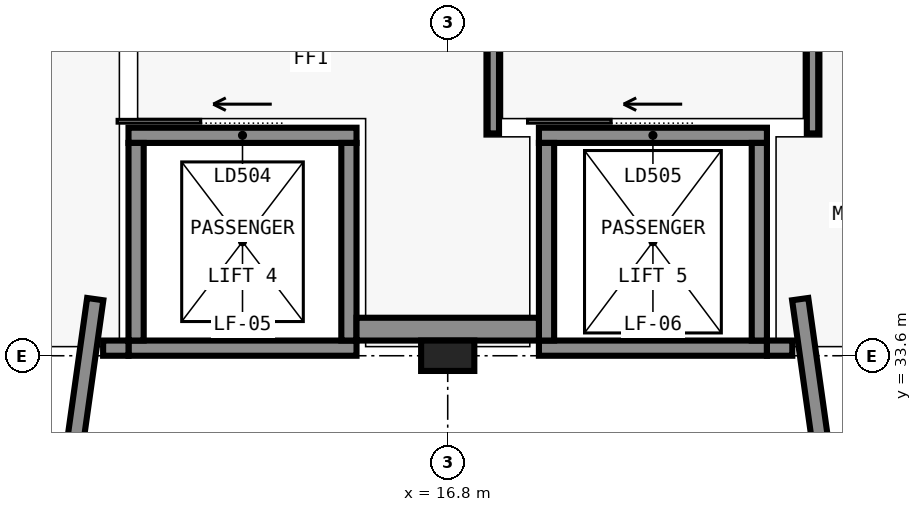
"""IFC4 building model, lengths in metres.
Left out: names, types, materials, properties, quantities, classifications, styles, units other than length and angle.
Written with IfcOpenShell. Run it as: python <this file> out.ifc"""

import sys

from ifc_helpers import new_model, si_unit, direction, frame, frame_2d, origin, origin_2d, place, context, subcontext, project, spatial, rectangle, extrude, element, fill, save


model = new_model("IFC4")
c1 = context("Model", 3, precision=1e-05, world=origin(), true_north=direction((0.0, 1.0)))
c2 = subcontext(c1, "Body", "Model", "MODEL_VIEW")
j1 = project(units=[si_unit("LENGTHUNIT", "METRE"), si_unit("PLANEANGLEUNIT", "RADIAN")], contexts=[c1])
p1 = place(None, origin())
s1 = spatial("IfcSite", under=j1, at=p1, CompositionType="ELEMENT")
p2 = place(p1, origin())
s2 = spatial("IfcBuilding", under=s1, at=p2, CompositionType="ELEMENT")
p3 = place(p2, frame((0.0, 0.0, 24.6)))
s3 = spatial("IfcBuildingStorey", under=s2, at=p3, CompositionType="ELEMENT", Elevation=24.6)
p4 = place(p3, frame((15.6, 33.7, 0.0), z_axis=(0.0, 0.0, 1.0), x_axis=(-1.0, 0.0, 0.0)))
e1 = element("IfcWall", 1, at=p4, inside=s3, PredefinedType="SHEAR", context=c2, shape_type="SweptSolid", body=[
    extrude(rectangle(XDim=3.0, YDim=0.2, at=frame_2d((1.5, 0.0))), origin(), (0.0, 0.0, 1.0), 4.112),
])
p5 = place(p3, frame((12.6, 36.5, 0.0), z_axis=(0.0, 0.0, 1.0), x_axis=(1.0, 0.0, 0.0)))
e2 = element("IfcWall", 2, at=p5, inside=s3, PredefinedType="SHEAR", context=c2, shape_type="SweptSolid", body=[
    extrude(rectangle(XDim=3.0, YDim=0.2, at=frame_2d((1.5, 0.0))), origin(), (0.0, 0.0, 1.0), 4.5),
])
p6 = place(p5, frame((0.95, 0.0, 0.0)))
e3 = element("IfcOpeningElement", 3, at=p6, cuts=e2, PredefinedType="OPENING", context=c2, shape_type="SweptSolid", body=[
    extrude(rectangle(XDim=1.1, YDim=2.1, at=frame_2d((0.55, 1.05))), frame((0.0, 0.11, 0.0), z_axis=(0.0, -1.0, 0.0), x_axis=(1.0, 0.0, 0.0)), (0.0, 0.0, 1.0), 0.22),
])
for number, where, z_axis, x_axis in (
    (4, (12.7, 33.8, 0.0), (0.0, 0.0, 1.0), (0.0, 1.0, 0.0)),
    (5, (15.5, 36.4, 0.0), (0.0, 0.0, 1.0), (0.0, -1.0, 0.0)),
):
    element("IfcWall", number, at=place(p3, frame(where, z_axis=z_axis, x_axis=x_axis)), inside=s3, PredefinedType="SHEAR", context=c2, shape_type="SweptSolid", body=[
        extrude(rectangle(XDim=2.6, YDim=0.2, at=frame_2d((1.3, 0.0))), origin(), (0.0, 0.0, 1.0), 4.5),
    ])
p7 = place(p3, frame((21.0, 33.7, 0.0), z_axis=(0.0, 0.0, 1.0), x_axis=(-1.0, 0.0, 0.0)))
e6 = element("IfcWall", 6, at=p7, inside=s3, PredefinedType="SHEAR", context=c2, shape_type="SweptSolid", body=[
    extrude(rectangle(XDim=3.0, YDim=0.2, at=frame_2d((1.5, 0.0))), origin(), (0.0, 0.0, 1.0), 4.112),
])
p8 = place(p3, frame((18.0, 36.5, 0.0), z_axis=(0.0, 0.0, 1.0), x_axis=(1.0, 0.0, 0.0)))
e7 = element("IfcWall", 7, at=p8, inside=s3, PredefinedType="SHEAR", context=c2, shape_type="SweptSolid", body=[
    extrude(rectangle(XDim=3.0, YDim=0.2, at=frame_2d((1.5, 0.0))), origin(), (0.0, 0.0, 1.0), 4.5),
])
p9 = place(p8, frame((0.95, 0.0, 0.0)))
e8 = element("IfcOpeningElement", 8, at=p9, cuts=e7, PredefinedType="OPENING", context=c2, shape_type="SweptSolid", body=[
    extrude(rectangle(XDim=1.1, YDim=2.1, at=frame_2d((0.55, 1.05))), frame((0.0, 0.11, 0.0), z_axis=(0.0, -1.0, 0.0), x_axis=(1.0, 0.0, 0.0)), (0.0, 0.0, 1.0), 0.22),
])
for number, where, z_axis, x_axis in (
    (9, (18.1, 33.8, 0.0), (0.0, 0.0, 1.0), (0.0, 1.0, 0.0)),
    (10, (20.9, 36.4, 0.0), (0.0, 0.0, 1.0), (0.0, -1.0, 0.0)),
):
    element("IfcWall", number, at=place(p3, frame(where, z_axis=z_axis, x_axis=x_axis)), inside=s3, PredefinedType="SHEAR", context=c2, shape_type="SweptSolid", body=[
        extrude(rectangle(XDim=2.6, YDim=0.2, at=frame_2d((1.3, 0.0))), origin(), (0.0, 0.0, 1.0), 4.5),
    ])
p10 = place(p3, frame((12.6, 33.7, 0.0), z_axis=(0.0, 0.0, 1.0), x_axis=(-1.0, 0.0, 0.0)))
e11 = element("IfcWall", 11, at=p10, inside=s3, PredefinedType="SHEAR", context=c2, shape_type="SweptSolid", body=[
    extrude(rectangle(XDim=0.334, YDim=0.2, at=frame_2d((0.167, 0.0))), origin(), (0.0, 0.0, 1.0), 4.5),
])
p11 = place(p3, frame((21.334, 33.7, 0.0), z_axis=(0.0, 0.0, 1.0), x_axis=(-1.0, 0.0, 0.0)))
e12 = element("IfcWall", 12, at=p11, inside=s3, PredefinedType="SHEAR", context=c2, shape_type="SweptSolid", body=[
    extrude(rectangle(XDim=0.334, YDim=0.2, at=frame_2d((0.167, 0.0))), origin(), (0.0, 0.0, 1.0), 4.5),
])
p12 = place(p3, frame((16.8, 33.6, 0.0), z_axis=(0.0, 0.0, 1.0), x_axis=(1.0, 0.0, 0.0)))
e13 = element("IfcColumn", 13, at=p12, inside=s3, PredefinedType="COLUMN", context=c2, shape_type="SweptSolid", body=[
    extrude(rectangle(XDim=0.7, YDim=0.4, at=origin_2d()), origin(), (0.0, 0.0, 1.0), 4.5),
])
p13 = place(p3, frame((12.162, 34.345, 0.0), z_axis=(0.0, 0.0, 1.0), x_axis=(-0.139120311566, -0.990275486372, 0.0)))
e14 = element("IfcWall", 14, at=p13, inside=s3, PredefinedType="SOLIDWALL", context=c2, shape_type="SweptSolid", body=[
    extrude(rectangle(XDim=2.169, YDim=0.215, at=frame_2d((1.084, 0.0))), origin(), (0.0, 0.0, 1.0), 4.2),
])
p14 = place(p3, frame((21.438, 34.345, 0.0), z_axis=(0.0, 0.0, 1.0), x_axis=(0.139230687381, -0.99025997379, 0.0)))
e15 = element("IfcWall", 15, at=p14, inside=s3, PredefinedType="SOLIDWALL", context=c2, shape_type="SweptSolid", body=[
    extrude(rectangle(XDim=2.169, YDim=0.215, at=frame_2d((1.084, 0.0))), origin(), (0.0, 0.0, 1.0), 4.2),
])
p15 = place(p3, frame((18.0, 33.95, 0.0), z_axis=(0.0, 0.0, 1.0), x_axis=(-1.0, 0.0, 0.0)))
e16 = element("IfcWall", 16, at=p15, inside=s3, PredefinedType="SOLIDWALL", context=c2, shape_type="SweptSolid", body=[
    extrude(rectangle(XDim=2.4, YDim=0.3, at=frame_2d((1.2, 0.0))), origin(), (0.0, 0.0, 1.0), 3.962),
])
p16 = place(p3, frame((17.4, 36.525, 0.0), z_axis=(0.0, 0.0, 1.0), x_axis=(0.0, 1.0, 0.0)))
e17 = element("IfcWall", 17, at=p16, inside=s3, PredefinedType="SOLIDWALL", context=c2, shape_type="SweptSolid", body=[
    extrude(rectangle(XDim=1.8, YDim=0.15, at=frame_2d((0.9, 0.0))), origin(), (0.0, 0.0, 1.0), 4.1),
])
p17 = place(p3, frame((21.6, 36.525, 0.0), z_axis=(0.0, 0.0, 1.0), x_axis=(0.0, 1.0, 0.0)))
e18 = element("IfcWall", 18, at=p17, inside=s3, PredefinedType="SOLIDWALL", context=c2, shape_type="SweptSolid", body=[
    extrude(rectangle(XDim=3.0, YDim=0.15, at=frame_2d((1.5, 0.0))), origin(), (0.0, 0.0, 1.0), 4.1),
])
p18 = place(p6, origin())
e19 = element("IfcDoor", 19, at=p18, inside=s3, OperationType="SLIDING_TO_LEFT", PredefinedType="DOOR", context=c2, shape_type="SweptSolid", body=[
    extrude(rectangle(XDim=1.1, YDim=2.1, at=frame_2d((0.55, 1.05))), frame((0.0, 0.025, 0.0), z_axis=(0.0, -1.0, 0.0), x_axis=(1.0, 0.0, 0.0)), (0.0, 0.0, 1.0), 0.05),
])
fill(e3, e19)
p19 = place(p9, origin())
e20 = element("IfcDoor", 20, at=p19, inside=s3, OperationType="SLIDING_TO_LEFT", PredefinedType="DOOR", context=c2, shape_type="SweptSolid", body=[
    extrude(rectangle(XDim=1.1, YDim=2.1, at=frame_2d((0.55, 1.05))), frame((0.0, 0.025, 0.0), z_axis=(0.0, -1.0, 0.0), x_axis=(1.0, 0.0, 0.0)), (0.0, 0.0, 1.0), 0.05),
])
fill(e8, e20)
save(model, sys.argv[1])
